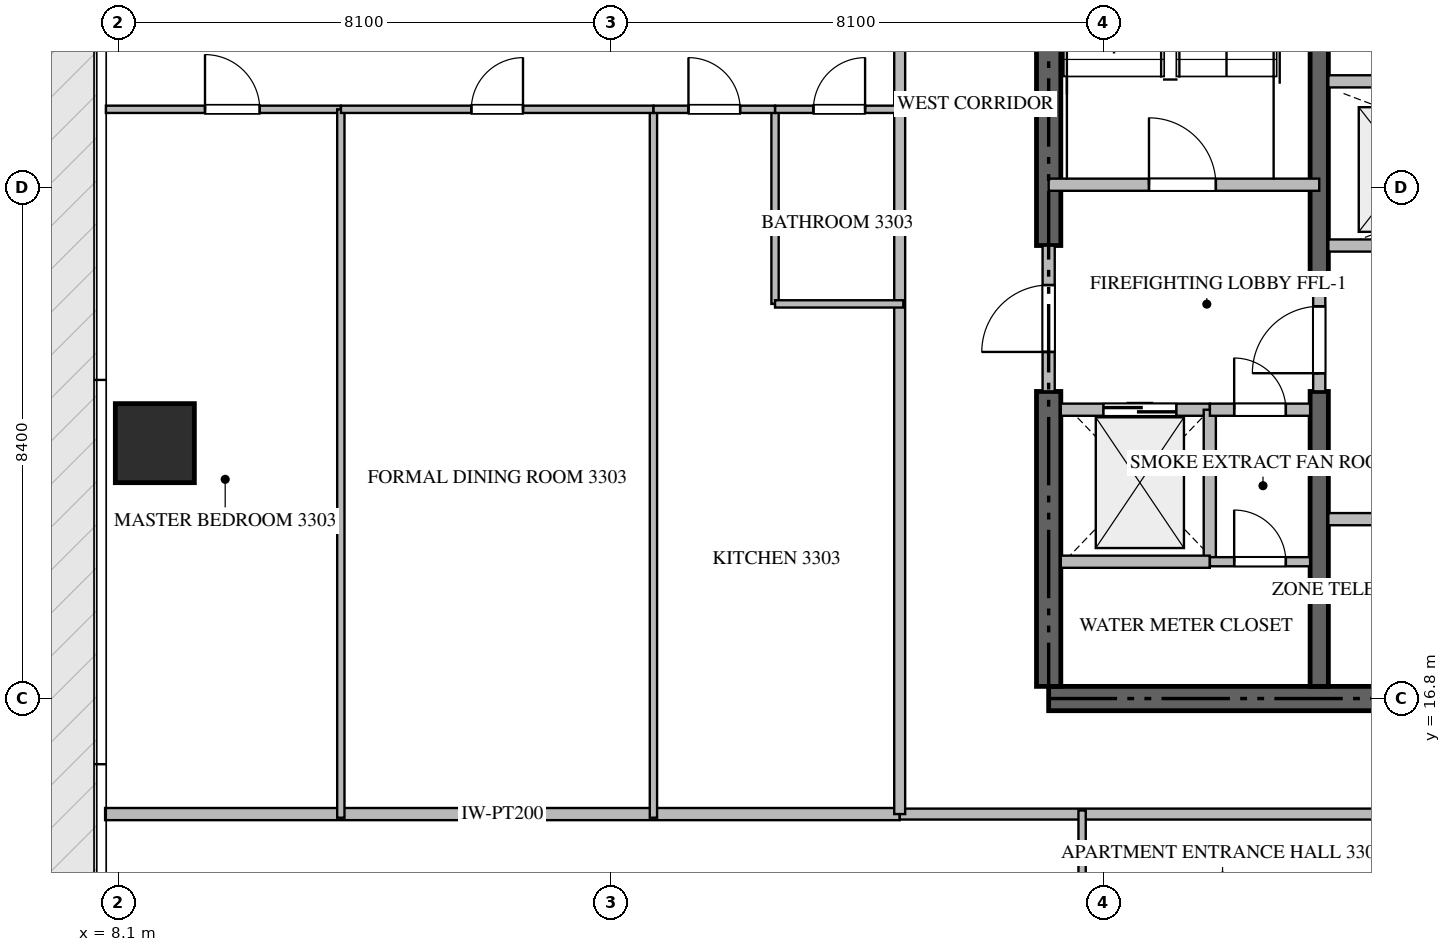
"""IFC4 building model, lengths in metres.
Left out: names, types, materials, properties, quantities, classifications, styles, units other than length and angle.
Written with IfcOpenShell. Run it as: python <this file> out.ifc"""

import sys

from ifc_helpers import new_model, si_unit, direction, frame, frame_2d, origin, origin_2d, place, context, subcontext, project, spatial, rectangle, extrude, source, transform, mapped, element, fill, save


model = new_model("IFC4")
c1 = context("Model", 3, precision=1e-05, world=origin(), true_north=direction((0.0, 1.0)))
c2 = subcontext(c1, "Body", "Model", "MODEL_VIEW")
j1 = project(units=[si_unit("LENGTHUNIT", "METRE"), si_unit("PLANEANGLEUNIT", "RADIAN")], contexts=[c1])
p1 = place(None, origin())
s1 = spatial("IfcSite", under=j1, at=p1, CompositionType="ELEMENT")
p2 = place(p1, origin())
s2 = spatial("IfcBuilding", under=s1, at=p2, CompositionType="ELEMENT")
p3 = place(p2, frame((0.0, 0.0, 135.15)))
s3 = spatial("IfcBuildingStorey", under=s2, at=p3, CompositionType="ELEMENT", Elevation=135.15)
p4 = place(p3, frame((23.4, 16.8, -0.26), z_axis=(0.0, 0.0, 1.0), x_axis=(1.0, 0.0, 0.0)))
e1 = element("IfcWall", 1, at=p4, inside=s3, PredefinedType="SHEAR", context=c2, shape_type="SweptSolid", body=[
    extrude(rectangle(XDim=18.0, YDim=0.4, at=frame_2d((9.0, 0.0))), origin(), (0.0, 0.0, 1.0), 3.748),
])
p5 = place(p3, frame((23.4, 17.0, -0.26), z_axis=(0.0, 0.0, 1.0), x_axis=(0.0, 1.0, 0.0)))
e2 = element("IfcWall", 2, at=p5, inside=s3, PredefinedType="SHEAR", context=c2, shape_type="SweptSolid", body=[
    extrude(rectangle(XDim=4.85, YDim=0.4, at=frame_2d((2.425, 0.0))), origin(), (0.0, 0.0, 1.0), 3.748),
])
p6 = place(p3, frame((23.4, 24.25, -0.26), z_axis=(0.0, 0.0, 1.0), x_axis=(0.0, 1.0, 0.0)))
e3 = element("IfcWall", 3, at=p6, inside=s3, PredefinedType="SHEAR", context=c2, shape_type="SweptSolid", body=[
    extrude(rectangle(XDim=9.15, YDim=0.4, at=frame_2d((4.575, 0.0))), origin(), (0.0, 0.0, 1.0), 3.748),
])
p7 = place(p3, frame((27.85, 17.0, -0.26), z_axis=(0.0, 0.0, 1.0), x_axis=(0.0, 1.0, 0.0)))
e4 = element("IfcWall", 4, at=p7, inside=s3, PredefinedType="SHEAR", context=c2, shape_type="SweptSolid", body=[
    extrude(rectangle(XDim=4.85, YDim=0.3, at=frame_2d((2.425, 0.0))), origin(), (0.0, 0.0, 1.0), 3.748),
])
p8 = place(p3, frame((27.85, 23.55, -0.26), z_axis=(0.0, 0.0, 1.0), x_axis=(0.0, 1.0, 0.0)))
e5 = element("IfcWall", 5, at=p8, inside=s3, PredefinedType="SHEAR", context=c2, shape_type="SweptSolid", body=[
    extrude(rectangle(XDim=9.85, YDim=0.3, at=frame_2d((4.925, 0.0))), origin(), (0.0, 0.0, 1.0), 3.748),
])
m1 = source(origin(), c2, "Body", "SweptSolid", [
    extrude(rectangle(XDim=1.3, YDim=1.3, at=origin_2d()), origin(), (0.0, 0.0, 1.0), 3.75),
])
p9 = place(p3, frame((8.7, 21.0, -0.26), z_axis=(0.0, 0.0, 1.0), x_axis=(1.0, 0.0, 0.0)))
e6 = element("IfcColumn", 6, at=p9, inside=s3, PredefinedType="COLUMN", context=c2, shape_type="MappedRepresentation", body=[
    mapped(m1, transform((0.0, 0.0, 0.0), scale=1.0)),
])
p10 = place(p3, frame((23.4, 25.25, 0.0), z_axis=(0.0, 0.0, 1.0), x_axis=(1.0, 0.0, 0.0)))
e7 = element("IfcWall", 7, at=p10, inside=s3, PredefinedType="STANDARD", context=c2, shape_type="SweptSolid", body=[
    extrude(rectangle(XDim=4.45, YDim=0.2, at=frame_2d((2.225, 0.0))), origin(), (0.0, 0.0, 1.0), 3.49),
])
p11 = place(p10, frame((1.65, 0.0, 0.0)))
e8 = element("IfcOpeningElement", 8, at=p11, cuts=e7, PredefinedType="OPENING", context=c2, shape_type="SweptSolid", body=[
    extrude(rectangle(XDim=1.1, YDim=2.15, at=frame_2d((0.55, 1.075))), frame((0.0, 0.11, 0.0), z_axis=(0.0, -1.0, 0.0), x_axis=(1.0, 0.0, 0.0)), (0.0, 0.0, 1.0), 0.22),
])
p12 = place(p3, frame((23.6, 21.55, 0.0), z_axis=(0.0, 0.0, 1.0), x_axis=(1.0, 0.0, 0.0)))
e9 = element("IfcWall", 9, at=p12, inside=s3, PredefinedType="STANDARD", context=c2, shape_type="SweptSolid", body=[
    extrude(rectangle(XDim=2.45, YDim=0.2, at=frame_2d((1.225, 0.0))), origin(), (0.0, 0.0, 1.0), 3.49),
])
p13 = place(p12, frame((0.7, 0.0, 0.0)))
e10 = element("IfcOpeningElement", 10, at=p13, cuts=e9, PredefinedType="OPENING", context=c2, shape_type="SweptSolid", body=[
    extrude(rectangle(XDim=1.2, YDim=2.2, at=frame_2d((0.6, 1.1))), frame((0.0, 0.11, 0.0), z_axis=(0.0, -1.0, 0.0), x_axis=(1.0, 0.0, 0.0)), (0.0, 0.0, 1.0), 0.22),
])
p14 = place(p3, frame((28.0, 24.25, 0.0), z_axis=(0.0, 0.0, 1.0), x_axis=(1.0, 0.0, 0.0)))
e11 = element("IfcWall", 11, at=p14, inside=s3, PredefinedType="STANDARD", context=c2, shape_type="SweptSolid", body=[
    extrude(rectangle(XDim=2.425, YDim=0.2, at=frame_2d((1.212, 0.0))), origin(), (0.0, 0.0, 1.0), 3.49),
])
p15 = place(p14, frame((0.75, 0.0, 0.0)))
e12 = element("IfcOpeningElement", 12, at=p15, cuts=e11, PredefinedType="OPENING", context=c2, shape_type="SweptSolid", body=[
    extrude(rectangle(XDim=1.1, YDim=2.2, at=frame_2d((0.55, 1.1))), frame((0.0, 0.11, 0.0), z_axis=(0.0, -1.0, 0.0), x_axis=(1.0, 0.0, 0.0)), (0.0, 0.0, 1.0), 0.22),
])
p16 = place(p3, frame((26.05, 19.05, 0.0), z_axis=(0.0, 0.0, 1.0), x_axis=(0.0, 1.0, 0.0)))
e13 = element("IfcWall", 13, at=p16, inside=s3, PredefinedType="STANDARD", context=c2, shape_type="SweptSolid", body=[
    extrude(rectangle(XDim=2.5, YDim=0.2, at=frame_2d((1.25, 0.0))), origin(), (0.0, 0.0, 1.0), 3.49),
])
p17 = place(p3, frame((23.6, 19.05, 0.0), z_axis=(0.0, 0.0, 1.0), x_axis=(1.0, 0.0, 0.0)))
e14 = element("IfcWall", 14, at=p17, inside=s3, PredefinedType="STANDARD", context=c2, shape_type="SweptSolid", body=[
    extrude(rectangle(XDim=2.45, YDim=0.2, at=frame_2d((1.225, 0.0))), origin(), (0.0, 0.0, 1.0), 3.49),
])
p18 = place(p3, frame((26.052, 21.55, 0.0), z_axis=(0.0, 0.0, 1.0), x_axis=(1.0, 0.0, 0.0)))
e15 = element("IfcWall", 15, at=p18, inside=s3, PredefinedType="STANDARD", context=c2, shape_type="SweptSolid", body=[
    extrude(rectangle(XDim=1.648, YDim=0.2, at=frame_2d((0.824, 0.0))), origin(), (0.0, 0.0, 1.0), 3.49),
])
p19 = place(p18, frame((0.399, 0.0, 0.0)))
e16 = element("IfcOpeningElement", 16, at=p19, cuts=e15, PredefinedType="OPENING", context=c2, shape_type="SweptSolid", body=[
    extrude(rectangle(XDim=0.85, YDim=2.1, at=frame_2d((0.425, 1.05))), frame((0.0, 0.11, 0.0), z_axis=(0.0, -1.0, 0.0), x_axis=(1.0, 0.0, 0.0)), (0.0, 0.0, 1.0), 0.22),
])
p20 = place(p3, frame((23.4, 21.852, 0.0), z_axis=(0.0, 0.0, 1.0), x_axis=(0.0, 1.0, 0.0)))
e17 = element("IfcWall", 17, at=p20, inside=s3, PredefinedType="STANDARD", context=c2, shape_type="SweptSolid", body=[
    extrude(rectangle(XDim=2.396, YDim=0.2, at=frame_2d((1.198, 0.0))), origin(), (0.0, 0.0, 1.0), 3.49),
])
p21 = place(p20, frame((0.648, 0.0, 0.0)))
e18 = element("IfcOpeningElement", 18, at=p21, cuts=e17, PredefinedType="OPENING", context=c2, shape_type="SweptSolid", body=[
    extrude(rectangle(XDim=1.1, YDim=2.15, at=frame_2d((0.55, 1.075))), frame((0.0, 0.11, 0.0), z_axis=(0.0, -1.0, 0.0), x_axis=(1.0, 0.0, 0.0)), (0.0, 0.0, 1.0), 0.22),
])
p22 = place(p3, frame((27.85, 21.852, 0.0), z_axis=(0.0, 0.0, 1.0), x_axis=(0.0, 1.0, 0.0)))
e19 = element("IfcWall", 19, at=p22, inside=s3, PredefinedType="STANDARD", context=c2, shape_type="SweptSolid", body=[
    extrude(rectangle(XDim=1.696, YDim=0.2, at=frame_2d((0.848, 0.0))), origin(), (0.0, 0.0, 1.0), 3.49),
])
p23 = place(p22, frame((0.298, 0.0, 0.0)))
e20 = element("IfcOpeningElement", 20, at=p23, cuts=e19, PredefinedType="OPENING", context=c2, shape_type="SweptSolid", body=[
    extrude(rectangle(XDim=1.1, YDim=2.15, at=frame_2d((0.55, 1.075))), frame((0.0, 0.11, 0.0), z_axis=(0.0, -1.0, 0.0), x_axis=(1.0, 0.0, 0.0)), (0.0, 0.0, 1.0), 0.22),
])
p24 = place(p3, frame((28.0, 26.95, 0.0), z_axis=(0.0, 0.0, 1.0), x_axis=(1.0, 0.0, 0.0)))
e21 = element("IfcWall", 21, at=p24, inside=s3, PredefinedType="STANDARD", context=c2, shape_type="SweptSolid", body=[
    extrude(rectangle(XDim=6.95, YDim=0.2, at=frame_2d((3.475, 0.0))), origin(), (0.0, 0.0, 1.0), 3.49),
])
p25 = place(p3, frame((26.052, 19.05, 0.0), z_axis=(0.0, 0.0, 1.0), x_axis=(1.0, 0.0, 0.0)))
e22 = element("IfcWall", 22, at=p25, inside=s3, PredefinedType="PARTITIONING", context=c2, shape_type="SweptSolid", body=[
    extrude(rectangle(XDim=1.648, YDim=0.15, at=frame_2d((0.824, 0.0))), origin(), (0.0, 0.0, 1.0), 3.49),
])
p26 = place(p25, frame((0.399, 0.0, 0.0)))
e23 = element("IfcOpeningElement", 23, at=p26, cuts=e22, PredefinedType="OPENING", context=c2, shape_type="SweptSolid", body=[
    extrude(rectangle(XDim=0.85, YDim=2.1, at=frame_2d((0.425, 1.05))), frame((0.0, 0.085, 0.0), z_axis=(0.0, -1.0, 0.0), x_axis=(1.0, 0.0, 0.0)), (0.0, 0.0, 1.0), 0.17),
])
p27 = place(p3, frame((28.0, 19.75, 0.0), z_axis=(0.0, 0.0, 1.0), x_axis=(1.0, 0.0, 0.0)))
e24 = element("IfcWall", 24, at=p27, inside=s3, PredefinedType="STANDARD", context=c2, shape_type="SweptSolid", body=[
    extrude(rectangle(XDim=6.0, YDim=0.2, at=frame_2d((3.0, 0.0))), origin(), (0.0, 0.0, 1.0), 3.49),
])
p28 = place(p27, frame((2.55, 0.0, 0.0)))
e25 = element("IfcOpeningElement", 25, at=p28, cuts=e24, PredefinedType="OPENING", context=c2, shape_type="SweptSolid", body=[
    extrude(rectangle(XDim=0.9, YDim=2.1, at=frame_2d((0.45, 1.05))), frame((0.0, 0.11, 0.0), z_axis=(0.0, -1.0, 0.0), x_axis=(1.0, 0.0, 0.0)), (0.0, 0.0, 1.0), 0.22),
])
p29 = place(p3, frame((7.882, 14.9, 0.0), z_axis=(0.0, 0.0, 1.0), x_axis=(1.0, 0.0, 0.0)))
e26 = element("IfcWall", 26, at=p29, inside=s3, PredefinedType="PARTITIONING", context=c2, shape_type="SweptSolid", body=[
    extrude(rectangle(XDim=13.068, YDim=0.2, at=frame_2d((6.534, 0.0))), origin(), (0.0, 0.0, 1.0), 3.49),
])
p30 = place(p3, frame((20.952, 14.9, 0.0), z_axis=(0.0, 0.0, 1.0), x_axis=(1.0, 0.0, 0.0)))
e27 = element("IfcWall", 27, at=p30, inside=s3, PredefinedType="PARTITIONING", context=c2, shape_type="SweptSolid", body=[
    extrude(rectangle(XDim=22.896, YDim=0.18, at=frame_2d((11.448, 0.0))), origin(), (0.0, 0.0, 1.0), 3.49),
])
p31 = place(p30, frame((15.809, 0.0, 0.0)))
e28 = element("IfcOpeningElement", 28, at=p31, cuts=e27, PredefinedType="OPENING", context=c2, shape_type="SweptSolid", body=[
    extrude(rectangle(XDim=1.0, YDim=2.15, at=frame_2d((0.5, 1.075))), frame((0.0, 0.1, 0.0), z_axis=(0.0, -1.0, 0.0), x_axis=(1.0, 0.0, 0.0)), (0.0, 0.0, 1.0), 0.2),
])
p32 = place(p3, frame((20.95, 14.9, 0.0), z_axis=(0.0, 0.0, 1.0), x_axis=(0.0, 1.0, 0.0)))
e29 = element("IfcWall", 29, at=p32, inside=s3, PredefinedType="PARTITIONING", context=c2, shape_type="SweptSolid", body=[
    extrude(rectangle(XDim=18.7, YDim=0.18, at=frame_2d((9.35, 0.0))), origin(), (0.0, 0.0, 1.0), 3.49),
])
p33 = place(p32, frame((14.603, 0.0, 0.0)))
e30 = element("IfcOpeningElement", 30, at=p33, cuts=e29, PredefinedType="OPENING", context=c2, shape_type="SweptSolid", body=[
    extrude(rectangle(XDim=1.0, YDim=2.15, at=frame_2d((0.5, 1.075))), frame((0.0, 0.1, 0.0), z_axis=(0.0, -1.0, 0.0), x_axis=(1.0, 0.0, 0.0)), (0.0, 0.0, 1.0), 0.2),
])
p34 = place(p3, frame((23.95, 12.752, 0.0), z_axis=(0.0, 0.0, 1.0), x_axis=(0.0, 1.0, 0.0)))
e31 = element("IfcWall", 31, at=p34, inside=s3, PredefinedType="PARTITIONING", context=c2, shape_type="SweptSolid", body=[
    extrude(rectangle(XDim=2.208, YDim=0.12, at=frame_2d((1.104, 0.0))), origin(), (0.0, 0.0, 1.0), 3.49),
])
p35 = place(p3, frame((7.895, 26.49, 0.0), z_axis=(0.0, 0.0, 1.0), x_axis=(1.0, 0.0, 0.0)))
e32 = element("IfcWall", 32, at=p35, inside=s3, PredefinedType="PARTITIONING", context=c2, shape_type="SweptSolid", body=[
    extrude(rectangle(XDim=3.864, YDim=0.12, at=frame_2d((1.932, 0.0))), origin(), (0.0, 0.0, 1.0), 3.49),
])
p36 = place(p35, frame((1.63, 0.0, 0.0)))
e33 = element("IfcOpeningElement", 33, at=p36, cuts=e32, PredefinedType="OPENING", context=c2, shape_type="SweptSolid", body=[
    extrude(rectangle(XDim=0.9, YDim=2.1, at=frame_2d((0.45, 1.05))), frame((0.0, 0.07, 0.0), z_axis=(0.0, -1.0, 0.0), x_axis=(1.0, 0.0, 0.0)), (0.0, 0.0, 1.0), 0.14),
])
p37 = place(p3, frame((11.759, 14.84, 0.0), z_axis=(0.0, 0.0, 1.0), x_axis=(0.0, 1.0, 0.0)))
e34 = element("IfcWall", 34, at=p37, inside=s3, PredefinedType="PARTITIONING", context=c2, shape_type="SweptSolid", body=[
    extrude(rectangle(XDim=11.65, YDim=0.12, at=frame_2d((5.825, 0.0))), origin(), (0.0, 0.0, 1.0), 3.49),
])
p38 = place(p3, frame((16.9, 14.84, 0.0), z_axis=(0.0, 0.0, 1.0), x_axis=(0.0, 1.0, 0.0)))
e35 = element("IfcWall", 35, at=p38, inside=s3, PredefinedType="PARTITIONING", context=c2, shape_type="SweptSolid", body=[
    extrude(rectangle(XDim=11.65, YDim=0.12, at=frame_2d((5.825, 0.0))), origin(), (0.0, 0.0, 1.0), 2.972),
])
p39 = place(p3, frame((18.9, 23.29, 0.0), z_axis=(0.0, 0.0, 1.0), x_axis=(0.0, 1.0, 0.0)))
e36 = element("IfcWall", 36, at=p39, inside=s3, PredefinedType="PARTITIONING", context=c2, shape_type="SweptSolid", body=[
    extrude(rectangle(XDim=3.2, YDim=0.12, at=frame_2d((1.6, 0.0))), origin(), (0.0, 0.0, 1.0), 3.49),
])
p40 = place(p3, frame((18.9, 23.29, 0.0), z_axis=(0.0, 0.0, 1.0), x_axis=(1.0, 0.0, 0.0)))
e37 = element("IfcWall", 37, at=p40, inside=s3, PredefinedType="PARTITIONING", context=c2, shape_type="SweptSolid", body=[
    extrude(rectangle(XDim=2.11, YDim=0.12, at=frame_2d((1.055, 0.0))), origin(), (0.0, 0.0, 1.0), 3.49),
])
p41 = place(p3, frame((11.761, 26.49, 0.0), z_axis=(0.0, 0.0, 1.0), x_axis=(1.0, 0.0, 0.0)))
e38 = element("IfcWall", 38, at=p41, inside=s3, PredefinedType="PARTITIONING", context=c2, shape_type="SweptSolid", body=[
    extrude(rectangle(XDim=5.139, YDim=0.12, at=frame_2d((2.569, 0.0))), origin(), (0.0, 0.0, 1.0), 3.49),
])
p42 = place(p41, frame((2.144, 0.0, 0.0)))
e39 = element("IfcOpeningElement", 39, at=p42, cuts=e38, PredefinedType="OPENING", context=c2, shape_type="SweptSolid", body=[
    extrude(rectangle(XDim=0.85, YDim=2.1, at=frame_2d((0.425, 1.05))), frame((0.0, 0.07, 0.0), z_axis=(0.0, -1.0, 0.0), x_axis=(1.0, 0.0, 0.0)), (0.0, 0.0, 1.0), 0.14),
])
p43 = place(p3, frame((16.902, 26.49, 0.0), z_axis=(0.0, 0.0, 1.0), x_axis=(1.0, 0.0, 0.0)))
e40 = element("IfcWall", 40, at=p43, inside=s3, PredefinedType="PARTITIONING", context=c2, shape_type="SweptSolid", body=[
    extrude(rectangle(XDim=1.998, YDim=0.12, at=frame_2d((0.999, 0.0))), origin(), (0.0, 0.0, 1.0), 3.49),
])
p44 = place(p43, frame((0.574, 0.0, 0.0)))
e41 = element("IfcOpeningElement", 41, at=p44, cuts=e40, PredefinedType="OPENING", context=c2, shape_type="SweptSolid", body=[
    extrude(rectangle(XDim=0.85, YDim=2.1, at=frame_2d((0.425, 1.05))), frame((0.0, 0.07, 0.0), z_axis=(0.0, -1.0, 0.0), x_axis=(1.0, 0.0, 0.0)), (0.0, 0.0, 1.0), 0.14),
])
p45 = place(p3, frame((18.902, 26.49, 0.0), z_axis=(0.0, 0.0, 1.0), x_axis=(1.0, 0.0, 0.0)))
e42 = element("IfcWall", 42, at=p45, inside=s3, PredefinedType="PARTITIONING", context=c2, shape_type="SweptSolid", body=[
    extrude(rectangle(XDim=2.108, YDim=0.12, at=frame_2d((1.054, 0.0))), origin(), (0.0, 0.0, 1.0), 3.49),
])
p46 = place(p45, frame((0.629, 0.0, 0.0)))
e43 = element("IfcOpeningElement", 43, at=p46, cuts=e42, PredefinedType="OPENING", context=c2, shape_type="SweptSolid", body=[
    extrude(rectangle(XDim=0.85, YDim=2.1, at=frame_2d((0.425, 1.05))), frame((0.0, 0.07, 0.0), z_axis=(0.0, -1.0, 0.0), x_axis=(1.0, 0.0, 0.0)), (0.0, 0.0, 1.0), 0.14),
])
m2 = source(origin(), c2, "Body", "SweptSolid", [
    extrude(rectangle(XDim=1.1, YDim=2.15, at=frame_2d((0.55, 1.075))), frame((0.0, 0.025, 0.0), z_axis=(0.0, -1.0, 0.0), x_axis=(1.0, 0.0, 0.0)), (0.0, 0.0, 1.0), 0.05),
])
p47 = place(p11, origin())
e44 = element("IfcDoor", 44, at=p47, inside=s3, OperationType="SINGLE_SWING_LEFT", PredefinedType="DOOR", context=c2, shape_type="MappedRepresentation", body=[
    mapped(m2, transform((0.0, 0.0, 0.0), scale=1.0)),
])
fill(e8, e44)
m3 = source(origin(), c2, "Body", "SweptSolid", [
    extrude(rectangle(XDim=1.2, YDim=2.2, at=frame_2d((0.6, 1.1))), frame((0.0, 0.025, 0.0), z_axis=(0.0, -1.0, 0.0), x_axis=(1.0, 0.0, 0.0)), (0.0, 0.0, 1.0), 0.05),
])
p48 = place(p13, origin())
e45 = element("IfcDoor", 45, at=p48, inside=s3, OperationType="DOUBLE_DOOR_SLIDING", PredefinedType="DOOR", context=c2, shape_type="MappedRepresentation", body=[
    mapped(m3, transform((0.0, 0.0, 0.0), scale=1.0)),
])
fill(e10, e45)
m4 = source(origin(), c2, "Body", "SweptSolid", [
    extrude(rectangle(XDim=0.85, YDim=2.1, at=frame_2d((0.425, 1.05))), frame((0.0, 0.025, 0.0), z_axis=(0.0, -1.0, 0.0), x_axis=(1.0, 0.0, 0.0)), (0.0, 0.0, 1.0), 0.05),
])
p49 = place(p19, origin())
e46 = element("IfcDoor", 46, at=p49, inside=s3, OperationType="SINGLE_SWING_LEFT", PredefinedType="DOOR", context=c2, shape_type="MappedRepresentation", body=[
    mapped(m4, transform((0.0, 0.0, 0.0), scale=1.0)),
])
fill(e16, e46)
p50 = place(p21, origin())
e47 = element("IfcDoor", 47, at=p50, inside=s3, OperationType="SINGLE_SWING_LEFT", PredefinedType="DOOR", context=c2, shape_type="MappedRepresentation", body=[
    mapped(m2, transform((0.0, 0.0, 0.0), scale=1.0)),
])
fill(e18, e47)
p51 = place(p23, origin())
e48 = element("IfcDoor", 48, at=p51, inside=s3, OperationType="SINGLE_SWING_LEFT", PredefinedType="DOOR", context=c2, shape_type="MappedRepresentation", body=[
    mapped(m2, transform((0.0, 0.0, 0.0), scale=1.0)),
])
fill(e20, e48)
p52 = place(p26, origin())
e49 = element("IfcDoor", 49, at=p52, inside=s3, OperationType="SINGLE_SWING_LEFT", PredefinedType="DOOR", context=c2, shape_type="MappedRepresentation", body=[
    mapped(m4, transform((0.0, 0.0, 0.0), scale=1.0)),
])
fill(e23, e49)
m5 = source(origin(), c2, "Body", "SweptSolid", [
    extrude(rectangle(XDim=0.9, YDim=2.1, at=frame_2d((0.45, 1.05))), frame((0.0, 0.025, 0.0), z_axis=(0.0, -1.0, 0.0), x_axis=(1.0, 0.0, 0.0)), (0.0, 0.0, 1.0), 0.05),
])
p53 = place(p36, origin())
e50 = element("IfcDoor", 50, at=p53, inside=s3, OperationType="SINGLE_SWING_LEFT", PredefinedType="DOOR", context=c2, shape_type="MappedRepresentation", body=[
    mapped(m5, transform((0.0, 0.0, 0.0), scale=1.0)),
])
fill(e33, e50)
p54 = place(p42, origin())
e51 = element("IfcDoor", 51, at=p54, inside=s3, OperationType="SINGLE_SWING_RIGHT", PredefinedType="DOOR", context=c2, shape_type="MappedRepresentation", body=[
    mapped(m4, transform((0.0, 0.0, 0.0), scale=1.0)),
])
fill(e39, e51)
p55 = place(p44, origin())
e52 = element("IfcDoor", 52, at=p55, inside=s3, OperationType="SINGLE_SWING_LEFT", PredefinedType="DOOR", context=c2, shape_type="MappedRepresentation", body=[
    mapped(m4, transform((0.0, 0.0, 0.0), scale=1.0)),
])
fill(e41, e52)
p56 = place(p46, origin())
e53 = element("IfcDoor", 53, at=p56, inside=s3, OperationType="SINGLE_SWING_RIGHT", PredefinedType="DOOR", context=c2, shape_type="MappedRepresentation", body=[
    mapped(m4, transform((0.0, 0.0, 0.0), scale=1.0)),
])
fill(e43, e53)
save(model, sys.argv[1])
